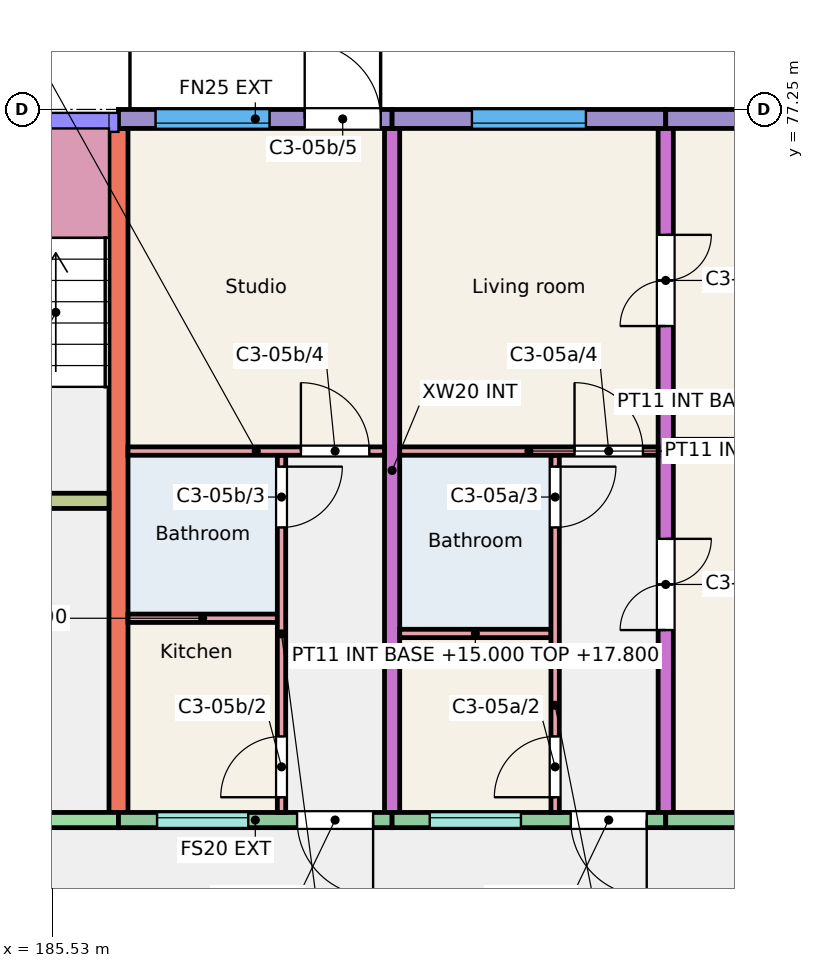
"""IFC4 building model, lengths in metres.
Left out: names, types, materials, properties, quantities, classifications, styles, units other than length and angle.
Written with IfcOpenShell. Run it as: python <this file> out.ifc"""

import sys

from ifc_helpers import new_model, si_unit, direction, frame, frame_2d, origin, place, context, subcontext, project, spatial, rectangle, extrude, element, fill, save


model = new_model("IFC4")
c1 = context("Model", 3, precision=1e-05, world=origin(), true_north=direction((0.0, 1.0)))
c2 = subcontext(c1, "Body", "Model", "MODEL_VIEW")
j1 = project(units=[si_unit("LENGTHUNIT", "METRE"), si_unit("PLANEANGLEUNIT", "RADIAN")], contexts=[c1])
p1 = place(None, origin())
s1 = spatial("IfcSite", under=j1, at=p1, CompositionType="ELEMENT")
p2 = place(p1, origin())
s2 = spatial("IfcBuilding", under=s1, at=p2, CompositionType="ELEMENT")
p3 = place(p2, frame((0.0, 0.0, 15.0)))
s3 = spatial("IfcBuildingStorey", under=s2, at=p3, CompositionType="ELEMENT", Elevation=15.0)
p4 = place(p3, frame((186.4, 68.0, 0.0), z_axis=(0.0, 0.0, 1.0), x_axis=(0.0, 1.0, 0.0)))
e1 = element("IfcWall", 1, at=p4, inside=s3, PredefinedType="SHEAR", context=c2, shape_type="SweptSolid", body=[
    extrude(rectangle(XDim=9.0, YDim=0.25, at=frame_2d((4.5, 0.0))), origin(), (0.0, 0.0, 1.0), 3.0),
])
p5 = place(p3, frame((190.0, 68.0, 0.0), z_axis=(0.0, 0.0, 1.0), x_axis=(0.0, 1.0, 0.0)))
e2 = element("IfcWall", 2, at=p5, inside=s3, PredefinedType="SHEAR", context=c2, shape_type="SweptSolid", body=[
    extrude(rectangle(XDim=9.0, YDim=0.2, at=frame_2d((4.5, 0.0))), origin(), (0.0, 0.0, 1.0), 3.0),
])
p6 = place(p3, frame((193.6, 68.0, 0.0), z_axis=(0.0, 0.0, 1.0), x_axis=(0.0, 1.0, 0.0)))
e3 = element("IfcWall", 3, at=p6, inside=s3, PredefinedType="SHEAR", context=c2, shape_type="SweptSolid", body=[
    extrude(rectangle(XDim=9.0, YDim=0.2, at=frame_2d((4.5, 0.0))), origin(), (0.0, 0.0, 1.0), 3.0),
])
p7 = place(p6, frame((2.4, 0.0, 0.0)))
e4 = element("IfcOpeningElement", 4, at=p7, cuts=e3, PredefinedType="OPENING", context=c2, shape_type="SweptSolid", body=[
    extrude(rectangle(XDim=1.2, YDim=2.1, at=frame_2d((0.6, 1.05))), frame((0.0, 0.11, 0.0), z_axis=(0.0, -1.0, 0.0), x_axis=(1.0, 0.0, 0.0)), (0.0, 0.0, 1.0), 0.22),
])
p8 = place(p6, frame((6.4, 0.0, 0.0)))
e5 = element("IfcOpeningElement", 5, at=p8, cuts=e3, PredefinedType="OPENING", context=c2, shape_type="SweptSolid", body=[
    extrude(rectangle(XDim=1.2, YDim=2.1, at=frame_2d((0.6, 1.05))), frame((0.0, 0.11, 0.0), z_axis=(0.0, -1.0, 0.0), x_axis=(1.0, 0.0, 0.0)), (0.0, 0.0, 1.0), 0.22),
])
p9 = place(p3, frame((180.55, 67.9, 0.0), z_axis=(0.0, 0.0, 1.0), x_axis=(1.0, 0.0, 0.0)))
e6 = element("IfcWall", 6, at=p9, inside=s3, PredefinedType="SHEAR", context=c2, shape_type="SweptSolid", body=[
    extrude(rectangle(XDim=5.85, YDim=0.2, at=frame_2d((2.925, 0.0))), origin(), (0.0, 0.0, 1.0), 3.0),
])
p10 = place(p9, frame((2.312, 0.0, 0.0)))
e7 = element("IfcOpeningElement", 7, at=p10, cuts=e6, PredefinedType="OPENING", context=c2, shape_type="SweptSolid", body=[
    extrude(rectangle(XDim=1.1, YDim=2.1, at=frame_2d((0.55, 1.05))), frame((0.0, 0.11, 0.0), z_axis=(0.0, -1.0, 0.0), x_axis=(1.0, 0.0, 0.0)), (0.0, 0.0, 1.0), 0.22),
])
p11 = place(p3, frame((180.55, 72.1, 0.0), z_axis=(0.0, 0.0, 1.0), x_axis=(1.0, 0.0, 0.0)))
e8 = element("IfcWall", 8, at=p11, inside=s3, PredefinedType="SHEAR", context=c2, shape_type="SweptSolid", body=[
    extrude(rectangle(XDim=5.725, YDim=0.2, at=frame_2d((2.862, 0.0))), origin(), (0.0, 0.0, 1.0), 3.0),
])
p12 = place(p11, frame((3.775, 0.0, 0.0)))
e9 = element("IfcOpeningElement", 9, at=p12, cuts=e8, PredefinedType="OPENING", context=c2, shape_type="SweptSolid", body=[
    extrude(rectangle(XDim=1.0, YDim=2.1, at=frame_2d((0.5, 1.05))), frame((0.0, 0.11, 0.0), z_axis=(0.0, -1.0, 0.0), x_axis=(1.0, 0.0, 0.0)), (0.0, 0.0, 1.0), 0.22),
])
p13 = place(p11, frame((0.762, 0.0, 0.0)))
e10 = element("IfcOpeningElement", 10, at=p13, cuts=e8, PredefinedType="OPENING", context=c2, shape_type="SweptSolid", body=[
    extrude(rectangle(XDim=1.1, YDim=2.1, at=frame_2d((0.55, 1.05))), frame((0.0, 0.11, 0.0), z_axis=(0.0, -1.0, 0.0), x_axis=(1.0, 0.0, 0.0)), (0.0, 0.0, 1.0), 0.22),
])
p14 = place(p3, frame((186.4, 77.125, 0.0), z_axis=(0.0, 0.0, 1.0), x_axis=(1.0, 0.0, 0.0)))
e11 = element("IfcWall", 11, at=p14, inside=s3, PredefinedType="SOLIDWALL", context=c2, shape_type="SweptSolid", body=[
    extrude(rectangle(XDim=3.6, YDim=0.25, at=frame_2d((1.8, 0.0))), origin(), (0.0, 0.0, 1.0), 3.0),
])
p15 = place(p14, frame((0.488, 0.0, 0.9)))
e12 = element("IfcOpeningElement", 12, at=p15, cuts=e11, PredefinedType="OPENING", context=c2, shape_type="SweptSolid", body=[
    extrude(rectangle(XDim=1.5, YDim=1.5, at=frame_2d((0.75, 0.75))), frame((0.0, 0.135, 0.0), z_axis=(0.0, -1.0, 0.0), x_axis=(1.0, 0.0, 0.0)), (0.0, 0.0, 1.0), 0.27),
])
p16 = place(p14, frame((2.45, 0.0, 0.0)))
e13 = element("IfcOpeningElement", 13, at=p16, cuts=e11, PredefinedType="OPENING", context=c2, shape_type="SweptSolid", body=[
    extrude(rectangle(XDim=1.0, YDim=2.1, at=frame_2d((0.5, 1.05))), frame((0.0, 0.135, 0.0), z_axis=(0.0, -1.0, 0.0), x_axis=(1.0, 0.0, 0.0)), (0.0, 0.0, 1.0), 0.27),
])
p17 = place(p3, frame((186.4, 67.9, 0.0), z_axis=(0.0, 0.0, 1.0), x_axis=(1.0, 0.0, 0.0)))
e14 = element("IfcWall", 14, at=p17, inside=s3, PredefinedType="SOLIDWALL", context=c2, shape_type="SweptSolid", body=[
    extrude(rectangle(XDim=3.6, YDim=0.2, at=frame_2d((1.8, 0.0))), origin(), (0.0, 0.0, 1.0), 3.0),
])
p18 = place(p17, frame((0.508, 0.0, 1.1)))
e15 = element("IfcOpeningElement", 15, at=p18, cuts=e14, PredefinedType="OPENING", context=c2, shape_type="SweptSolid", body=[
    extrude(rectangle(XDim=1.2, YDim=1.3, at=frame_2d((0.6, 0.65))), frame((0.0, 0.11, 0.0), z_axis=(0.0, -1.0, 0.0), x_axis=(1.0, 0.0, 0.0)), (0.0, 0.0, 1.0), 0.22),
])
p19 = place(p17, frame((2.35, 0.0, 0.0)))
e16 = element("IfcOpeningElement", 16, at=p19, cuts=e14, PredefinedType="OPENING", context=c2, shape_type="SweptSolid", body=[
    extrude(rectangle(XDim=1.0, YDim=2.1, at=frame_2d((0.5, 1.05))), frame((0.0, 0.11, 0.0), z_axis=(0.0, -1.0, 0.0), x_axis=(1.0, 0.0, 0.0)), (0.0, 0.0, 1.0), 0.22),
])
p20 = place(p3, frame((190.0, 77.125, 0.0), z_axis=(0.0, 0.0, 1.0), x_axis=(1.0, 0.0, 0.0)))
e17 = element("IfcWall", 17, at=p20, inside=s3, PredefinedType="SOLIDWALL", context=c2, shape_type="SweptSolid", body=[
    extrude(rectangle(XDim=3.6, YDim=0.25, at=frame_2d((1.8, 0.0))), origin(), (0.0, 0.0, 1.0), 3.0),
])
p21 = place(p20, frame((1.05, 0.0, 0.9)))
e18 = element("IfcOpeningElement", 18, at=p21, cuts=e17, PredefinedType="OPENING", context=c2, shape_type="SweptSolid", body=[
    extrude(rectangle(XDim=1.5, YDim=1.5, at=frame_2d((0.75, 0.75))), frame((0.0, 0.135, 0.0), z_axis=(0.0, -1.0, 0.0), x_axis=(1.0, 0.0, 0.0)), (0.0, 0.0, 1.0), 0.27),
])
p22 = place(p3, frame((190.0, 67.9, 0.0), z_axis=(0.0, 0.0, 1.0), x_axis=(1.0, 0.0, 0.0)))
e19 = element("IfcWall", 19, at=p22, inside=s3, PredefinedType="SOLIDWALL", context=c2, shape_type="SweptSolid", body=[
    extrude(rectangle(XDim=3.6, YDim=0.2, at=frame_2d((1.8, 0.0))), origin(), (0.0, 0.0, 1.0), 3.0),
])
p23 = place(p22, frame((0.495, 0.0, 1.1)))
e20 = element("IfcOpeningElement", 20, at=p23, cuts=e19, PredefinedType="OPENING", context=c2, shape_type="SweptSolid", body=[
    extrude(rectangle(XDim=1.2, YDim=1.3, at=frame_2d((0.6, 0.65))), frame((0.0, 0.11, 0.0), z_axis=(0.0, -1.0, 0.0), x_axis=(1.0, 0.0, 0.0)), (0.0, 0.0, 1.0), 0.22),
])
p24 = place(p22, frame((2.35, 0.0, 0.0)))
e21 = element("IfcOpeningElement", 21, at=p24, cuts=e19, PredefinedType="OPENING", context=c2, shape_type="SweptSolid", body=[
    extrude(rectangle(XDim=1.0, YDim=2.1, at=frame_2d((0.5, 1.05))), frame((0.0, 0.11, 0.0), z_axis=(0.0, -1.0, 0.0), x_axis=(1.0, 0.0, 0.0)), (0.0, 0.0, 1.0), 0.22),
])
p25 = place(p3, frame((193.6, 77.125, 0.0), z_axis=(0.0, 0.0, 1.0), x_axis=(1.0, 0.0, 0.0)))
e22 = element("IfcWall", 22, at=p25, inside=s3, PredefinedType="SOLIDWALL", context=c2, shape_type="SweptSolid", body=[
    extrude(rectangle(XDim=3.6, YDim=0.25, at=frame_2d((1.8, 0.0))), origin(), (0.0, 0.0, 1.0), 3.0),
])
p26 = place(p25, frame((1.025, 0.0, 0.9)))
e23 = element("IfcOpeningElement", 23, at=p26, cuts=e22, PredefinedType="OPENING", context=c2, shape_type="SweptSolid", body=[
    extrude(rectangle(XDim=1.5, YDim=1.5, at=frame_2d((0.75, 0.75))), frame((0.0, 0.135, 0.0), z_axis=(0.0, -1.0, 0.0), x_axis=(1.0, 0.0, 0.0)), (0.0, 0.0, 1.0), 0.27),
])
p27 = place(p3, frame((193.6, 67.9, 0.0), z_axis=(0.0, 0.0, 1.0), x_axis=(1.0, 0.0, 0.0)))
e24 = element("IfcWall", 24, at=p27, inside=s3, PredefinedType="SOLIDWALL", context=c2, shape_type="SweptSolid", body=[
    extrude(rectangle(XDim=3.45, YDim=0.2, at=frame_2d((1.725, 0.0))), origin(), (0.0, 0.0, 1.0), 3.0),
])
p28 = place(p27, frame((1.025, 0.0, 0.9)))
e25 = element("IfcOpeningElement", 25, at=p28, cuts=e24, PredefinedType="OPENING", context=c2, shape_type="SweptSolid", body=[
    extrude(rectangle(XDim=1.5, YDim=1.5, at=frame_2d((0.75, 0.75))), frame((0.0, 0.11, 0.0), z_axis=(0.0, -1.0, 0.0), x_axis=(1.0, 0.0, 0.0)), (0.0, 0.0, 1.0), 0.22),
])
p29 = place(p3, frame((190.1, 70.355, 0.0), z_axis=(0.0, 0.0, 1.0), x_axis=(1.0, 0.0, 0.0)))
e26 = element("IfcWall", 26, at=p29, inside=s3, PredefinedType="PARTITIONING", context=c2, shape_type="SweptSolid", body=[
    extrude(rectangle(XDim=1.99, YDim=0.11, at=frame_2d((0.995, 0.0))), origin(), (0.0, 0.0, 1.0), 2.8),
])
p30 = place(p3, frame((192.145, 68.0, 0.0), z_axis=(0.0, 0.0, 1.0), x_axis=(0.0, 1.0, 0.0)))
e27 = element("IfcWall", 27, at=p30, inside=s3, PredefinedType="PARTITIONING", context=c2, shape_type="SweptSolid", body=[
    extrude(rectangle(XDim=4.7, YDim=0.11, at=frame_2d((2.35, 0.0))), origin(), (0.0, 0.0, 1.0), 2.8),
])
p31 = place(p30, frame((0.2, 0.0, 0.0)))
e28 = element("IfcOpeningElement", 28, at=p31, cuts=e27, PredefinedType="OPENING", context=c2, shape_type="SweptSolid", body=[
    extrude(rectangle(XDim=0.8, YDim=2.1, at=frame_2d((0.4, 1.05))), frame((0.0, 0.065, 0.0), z_axis=(0.0, -1.0, 0.0), x_axis=(1.0, 0.0, 0.0)), (0.0, 0.0, 1.0), 0.13),
])
p32 = place(p30, frame((3.75, 0.0, 0.0)))
e29 = element("IfcOpeningElement", 29, at=p32, cuts=e27, PredefinedType="OPENING", context=c2, shape_type="SweptSolid", body=[
    extrude(rectangle(XDim=0.8, YDim=2.1, at=frame_2d((0.4, 1.05))), frame((0.0, 0.065, 0.0), z_axis=(0.0, -1.0, 0.0), x_axis=(1.0, 0.0, 0.0)), (0.0, 0.0, 1.0), 0.13),
])
p33 = place(p3, frame((190.1, 72.755, 0.0), z_axis=(0.0, 0.0, 1.0), x_axis=(1.0, 0.0, 0.0)))
e30 = element("IfcWall", 30, at=p33, inside=s3, PredefinedType="PARTITIONING", context=c2, shape_type="SweptSolid", body=[
    extrude(rectangle(XDim=3.4, YDim=0.11, at=frame_2d((1.7, 0.0))), origin(), (0.0, 0.0, 1.0), 2.8),
])
p34 = place(p33, frame((2.3, 0.0, 0.0)))
e31 = element("IfcOpeningElement", 31, at=p34, cuts=e30, PredefinedType="OPENING", context=c2, shape_type="SweptSolid", body=[
    extrude(rectangle(XDim=0.9, YDim=2.1, at=frame_2d((0.45, 1.05))), frame((0.0, 0.065, 0.0), z_axis=(0.0, -1.0, 0.0), x_axis=(1.0, 0.0, 0.0)), (0.0, 0.0, 1.0), 0.13),
])
p35 = place(p3, frame((193.7, 72.855, 0.0), z_axis=(0.0, 0.0, 1.0), x_axis=(1.0, 0.0, 0.0)))
e32 = element("IfcWall", 32, at=p35, inside=s3, PredefinedType="PARTITIONING", context=c2, shape_type="SweptSolid", body=[
    extrude(rectangle(XDim=3.35, YDim=0.11, at=frame_2d((1.675, 0.0))), origin(), (0.0, 0.0, 1.0), 2.8),
])
p36 = place(p3, frame((186.525, 70.555, 0.0), z_axis=(0.0, 0.0, 1.0), x_axis=(1.0, 0.0, 0.0)))
e33 = element("IfcWall", 33, at=p36, inside=s3, PredefinedType="PARTITIONING", context=c2, shape_type="SweptSolid", body=[
    extrude(rectangle(XDim=1.965, YDim=0.11, at=frame_2d((0.982, 0.0))), origin(), (0.0, 0.0, 1.0), 2.8),
])
p37 = place(p3, frame((188.545, 68.0, 0.0), z_axis=(0.0, 0.0, 1.0), x_axis=(0.0, 1.0, 0.0)))
e34 = element("IfcWall", 34, at=p37, inside=s3, PredefinedType="PARTITIONING", context=c2, shape_type="SweptSolid", body=[
    extrude(rectangle(XDim=4.7, YDim=0.11, at=frame_2d((2.35, 0.0))), origin(), (0.0, 0.0, 1.0), 2.8),
])
p38 = place(p37, frame((0.2, 0.0, 0.0)))
e35 = element("IfcOpeningElement", 35, at=p38, cuts=e34, PredefinedType="OPENING", context=c2, shape_type="SweptSolid", body=[
    extrude(rectangle(XDim=0.8, YDim=2.1, at=frame_2d((0.4, 1.05))), frame((0.0, 0.065, 0.0), z_axis=(0.0, -1.0, 0.0), x_axis=(1.0, 0.0, 0.0)), (0.0, 0.0, 1.0), 0.13),
])
p39 = place(p37, frame((3.75, 0.0, 0.0)))
e36 = element("IfcOpeningElement", 36, at=p39, cuts=e34, PredefinedType="OPENING", context=c2, shape_type="SweptSolid", body=[
    extrude(rectangle(XDim=0.8, YDim=2.1, at=frame_2d((0.4, 1.05))), frame((0.0, 0.065, 0.0), z_axis=(0.0, -1.0, 0.0), x_axis=(1.0, 0.0, 0.0)), (0.0, 0.0, 1.0), 0.13),
])
p40 = place(p3, frame((186.525, 72.755, 0.0), z_axis=(0.0, 0.0, 1.0), x_axis=(1.0, 0.0, 0.0)))
e37 = element("IfcWall", 37, at=p40, inside=s3, PredefinedType="PARTITIONING", context=c2, shape_type="SweptSolid", body=[
    extrude(rectangle(XDim=3.375, YDim=0.11, at=frame_2d((1.688, 0.0))), origin(), (0.0, 0.0, 1.0), 2.8),
])
p41 = place(p40, frame((2.275, 0.0, 0.0)))
e38 = element("IfcOpeningElement", 38, at=p41, cuts=e37, PredefinedType="OPENING", context=c2, shape_type="SweptSolid", body=[
    extrude(rectangle(XDim=0.9, YDim=2.1, at=frame_2d((0.45, 1.05))), frame((0.0, 0.065, 0.0), z_axis=(0.0, -1.0, 0.0), x_axis=(1.0, 0.0, 0.0)), (0.0, 0.0, 1.0), 0.13),
])
p42 = place(p23, origin())
e39 = element("IfcWindow", 39, at=p42, inside=s3, PartitioningType="SINGLE_PANEL", PredefinedType="WINDOW", context=c2, shape_type="SweptSolid", body=[
    extrude(rectangle(XDim=1.2, YDim=1.3, at=frame_2d((0.6, 0.65))), frame((0.0, 0.06, 0.0), z_axis=(0.0, -1.0, 0.0), x_axis=(1.0, 0.0, 0.0)), (0.0, 0.0, 1.0), 0.06),
])
fill(e20, e39)
p43 = place(p21, origin())
e40 = element("IfcWindow", 40, at=p43, inside=s3, PartitioningType="SINGLE_PANEL", PredefinedType="WINDOW", context=c2, shape_type="SweptSolid", body=[
    extrude(rectangle(XDim=1.5, YDim=1.5, at=frame_2d((0.75, 0.75))), frame((0.0, -0.025, 0.0), z_axis=(0.0, -1.0, 0.0), x_axis=(1.0, 0.0, 0.0)), (0.0, 0.0, 1.0), 0.06),
])
fill(e18, e40)
p44 = place(p18, origin())
e41 = element("IfcWindow", 41, at=p44, inside=s3, PartitioningType="SINGLE_PANEL", PredefinedType="WINDOW", context=c2, shape_type="SweptSolid", body=[
    extrude(rectangle(XDim=1.2, YDim=1.3, at=frame_2d((0.6, 0.65))), frame((0.0, 0.06, 0.0), z_axis=(0.0, -1.0, 0.0), x_axis=(1.0, 0.0, 0.0)), (0.0, 0.0, 1.0), 0.06),
])
fill(e15, e41)
p45 = place(p15, origin())
e42 = element("IfcWindow", 42, at=p45, inside=s3, PartitioningType="SINGLE_PANEL", PredefinedType="WINDOW", context=c2, shape_type="SweptSolid", body=[
    extrude(rectangle(XDim=1.5, YDim=1.5, at=frame_2d((0.75, 0.75))), frame((0.0, -0.025, 0.0), z_axis=(0.0, -1.0, 0.0), x_axis=(1.0, 0.0, 0.0)), (0.0, 0.0, 1.0), 0.06),
])
fill(e12, e42)
p46 = place(p24, origin())
e43 = element("IfcDoor", 43, at=p46, inside=s3, OperationType="SINGLE_SWING_RIGHT", PredefinedType="DOOR", context=c2, shape_type="SweptSolid", body=[
    extrude(rectangle(XDim=1.0, YDim=2.1, at=frame_2d((0.5, 1.05))), frame((0.0, 0.025, 0.0), z_axis=(0.0, -1.0, 0.0), x_axis=(1.0, 0.0, 0.0)), (0.0, 0.0, 1.0), 0.05),
])
fill(e21, e43)
p47 = place(p31, origin())
e44 = element("IfcDoor", 44, at=p47, inside=s3, OperationType="SINGLE_SWING_LEFT", PredefinedType="DOOR", context=c2, shape_type="SweptSolid", body=[
    extrude(rectangle(XDim=0.8, YDim=2.1, at=frame_2d((0.4, 1.05))), frame((0.0, 0.025, 0.0), z_axis=(0.0, -1.0, 0.0), x_axis=(1.0, 0.0, 0.0)), (0.0, 0.0, 1.0), 0.05),
])
fill(e28, e44)
p48 = place(p32, origin())
e45 = element("IfcDoor", 45, at=p48, inside=s3, OperationType="SINGLE_SWING_RIGHT", PredefinedType="DOOR", context=c2, shape_type="SweptSolid", body=[
    extrude(rectangle(XDim=0.8, YDim=2.1, at=frame_2d((0.4, 1.05))), frame((0.0, 0.025, 0.0), z_axis=(0.0, -1.0, 0.0), x_axis=(1.0, 0.0, 0.0)), (0.0, 0.0, 1.0), 0.05),
])
fill(e29, e45)
p49 = place(p34, origin())
e46 = element("IfcDoor", 46, at=p49, inside=s3, OperationType="SINGLE_SWING_LEFT", PredefinedType="DOOR", context=c2, shape_type="SweptSolid", body=[
    extrude(rectangle(XDim=0.9, YDim=2.1, at=frame_2d((0.45, 1.05))), frame((0.0, 0.025, 0.0), z_axis=(0.0, -1.0, 0.0), x_axis=(1.0, 0.0, 0.0)), (0.0, 0.0, 1.0), 0.05),
])
fill(e31, e46)
p50 = place(p7, origin())
e47 = element("IfcDoor", 47, at=p50, inside=s3, OperationType="DOUBLE_DOOR_SINGLE_SWING", PredefinedType="DOOR", context=c2, shape_type="SweptSolid", body=[
    extrude(rectangle(XDim=1.2, YDim=2.1, at=frame_2d((0.6, 1.05))), frame((0.0, 0.025, 0.0), z_axis=(0.0, -1.0, 0.0), x_axis=(1.0, 0.0, 0.0)), (0.0, 0.0, 1.0), 0.05),
])
fill(e4, e47)
p51 = place(p8, origin())
e48 = element("IfcDoor", 48, at=p51, inside=s3, OperationType="DOUBLE_DOOR_SINGLE_SWING", PredefinedType="DOOR", context=c2, shape_type="SweptSolid", body=[
    extrude(rectangle(XDim=1.2, YDim=2.1, at=frame_2d((0.6, 1.05))), frame((0.0, 0.025, 0.0), z_axis=(0.0, -1.0, 0.0), x_axis=(1.0, 0.0, 0.0)), (0.0, 0.0, 1.0), 0.05),
])
fill(e5, e48)
p52 = place(p19, origin())
e49 = element("IfcDoor", 49, at=p52, inside=s3, OperationType="SINGLE_SWING_RIGHT", PredefinedType="DOOR", context=c2, shape_type="SweptSolid", body=[
    extrude(rectangle(XDim=1.0, YDim=2.1, at=frame_2d((0.5, 1.05))), frame((0.0, 0.025, 0.0), z_axis=(0.0, -1.0, 0.0), x_axis=(1.0, 0.0, 0.0)), (0.0, 0.0, 1.0), 0.05),
])
fill(e16, e49)
p53 = place(p38, origin())
e50 = element("IfcDoor", 50, at=p53, inside=s3, OperationType="SINGLE_SWING_LEFT", PredefinedType="DOOR", context=c2, shape_type="SweptSolid", body=[
    extrude(rectangle(XDim=0.8, YDim=2.1, at=frame_2d((0.4, 1.05))), frame((0.0, 0.025, 0.0), z_axis=(0.0, -1.0, 0.0), x_axis=(1.0, 0.0, 0.0)), (0.0, 0.0, 1.0), 0.05),
])
fill(e35, e50)
p54 = place(p39, origin())
e51 = element("IfcDoor", 51, at=p54, inside=s3, OperationType="SINGLE_SWING_RIGHT", PredefinedType="DOOR", context=c2, shape_type="SweptSolid", body=[
    extrude(rectangle(XDim=0.8, YDim=2.1, at=frame_2d((0.4, 1.05))), frame((0.0, 0.025, 0.0), z_axis=(0.0, -1.0, 0.0), x_axis=(1.0, 0.0, 0.0)), (0.0, 0.0, 1.0), 0.05),
])
fill(e36, e51)
p55 = place(p41, origin())
e52 = element("IfcDoor", 52, at=p55, inside=s3, OperationType="SINGLE_SWING_LEFT", PredefinedType="DOOR", context=c2, shape_type="SweptSolid", body=[
    extrude(rectangle(XDim=0.9, YDim=2.1, at=frame_2d((0.45, 1.05))), frame((0.0, 0.025, 0.0), z_axis=(0.0, -1.0, 0.0), x_axis=(1.0, 0.0, 0.0)), (0.0, 0.0, 1.0), 0.05),
])
fill(e38, e52)
p56 = place(p16, origin())
e53 = element("IfcDoor", 53, at=p56, inside=s3, OperationType="SINGLE_SWING_LEFT", PredefinedType="DOOR", context=c2, shape_type="SweptSolid", body=[
    extrude(rectangle(XDim=1.0, YDim=2.1, at=frame_2d((0.5, 1.05))), frame((0.0, 0.025, 0.0), z_axis=(0.0, -1.0, 0.0), x_axis=(1.0, 0.0, 0.0)), (0.0, 0.0, 1.0), 0.05),
])
fill(e13, e53)
save(model, sys.argv[1])
